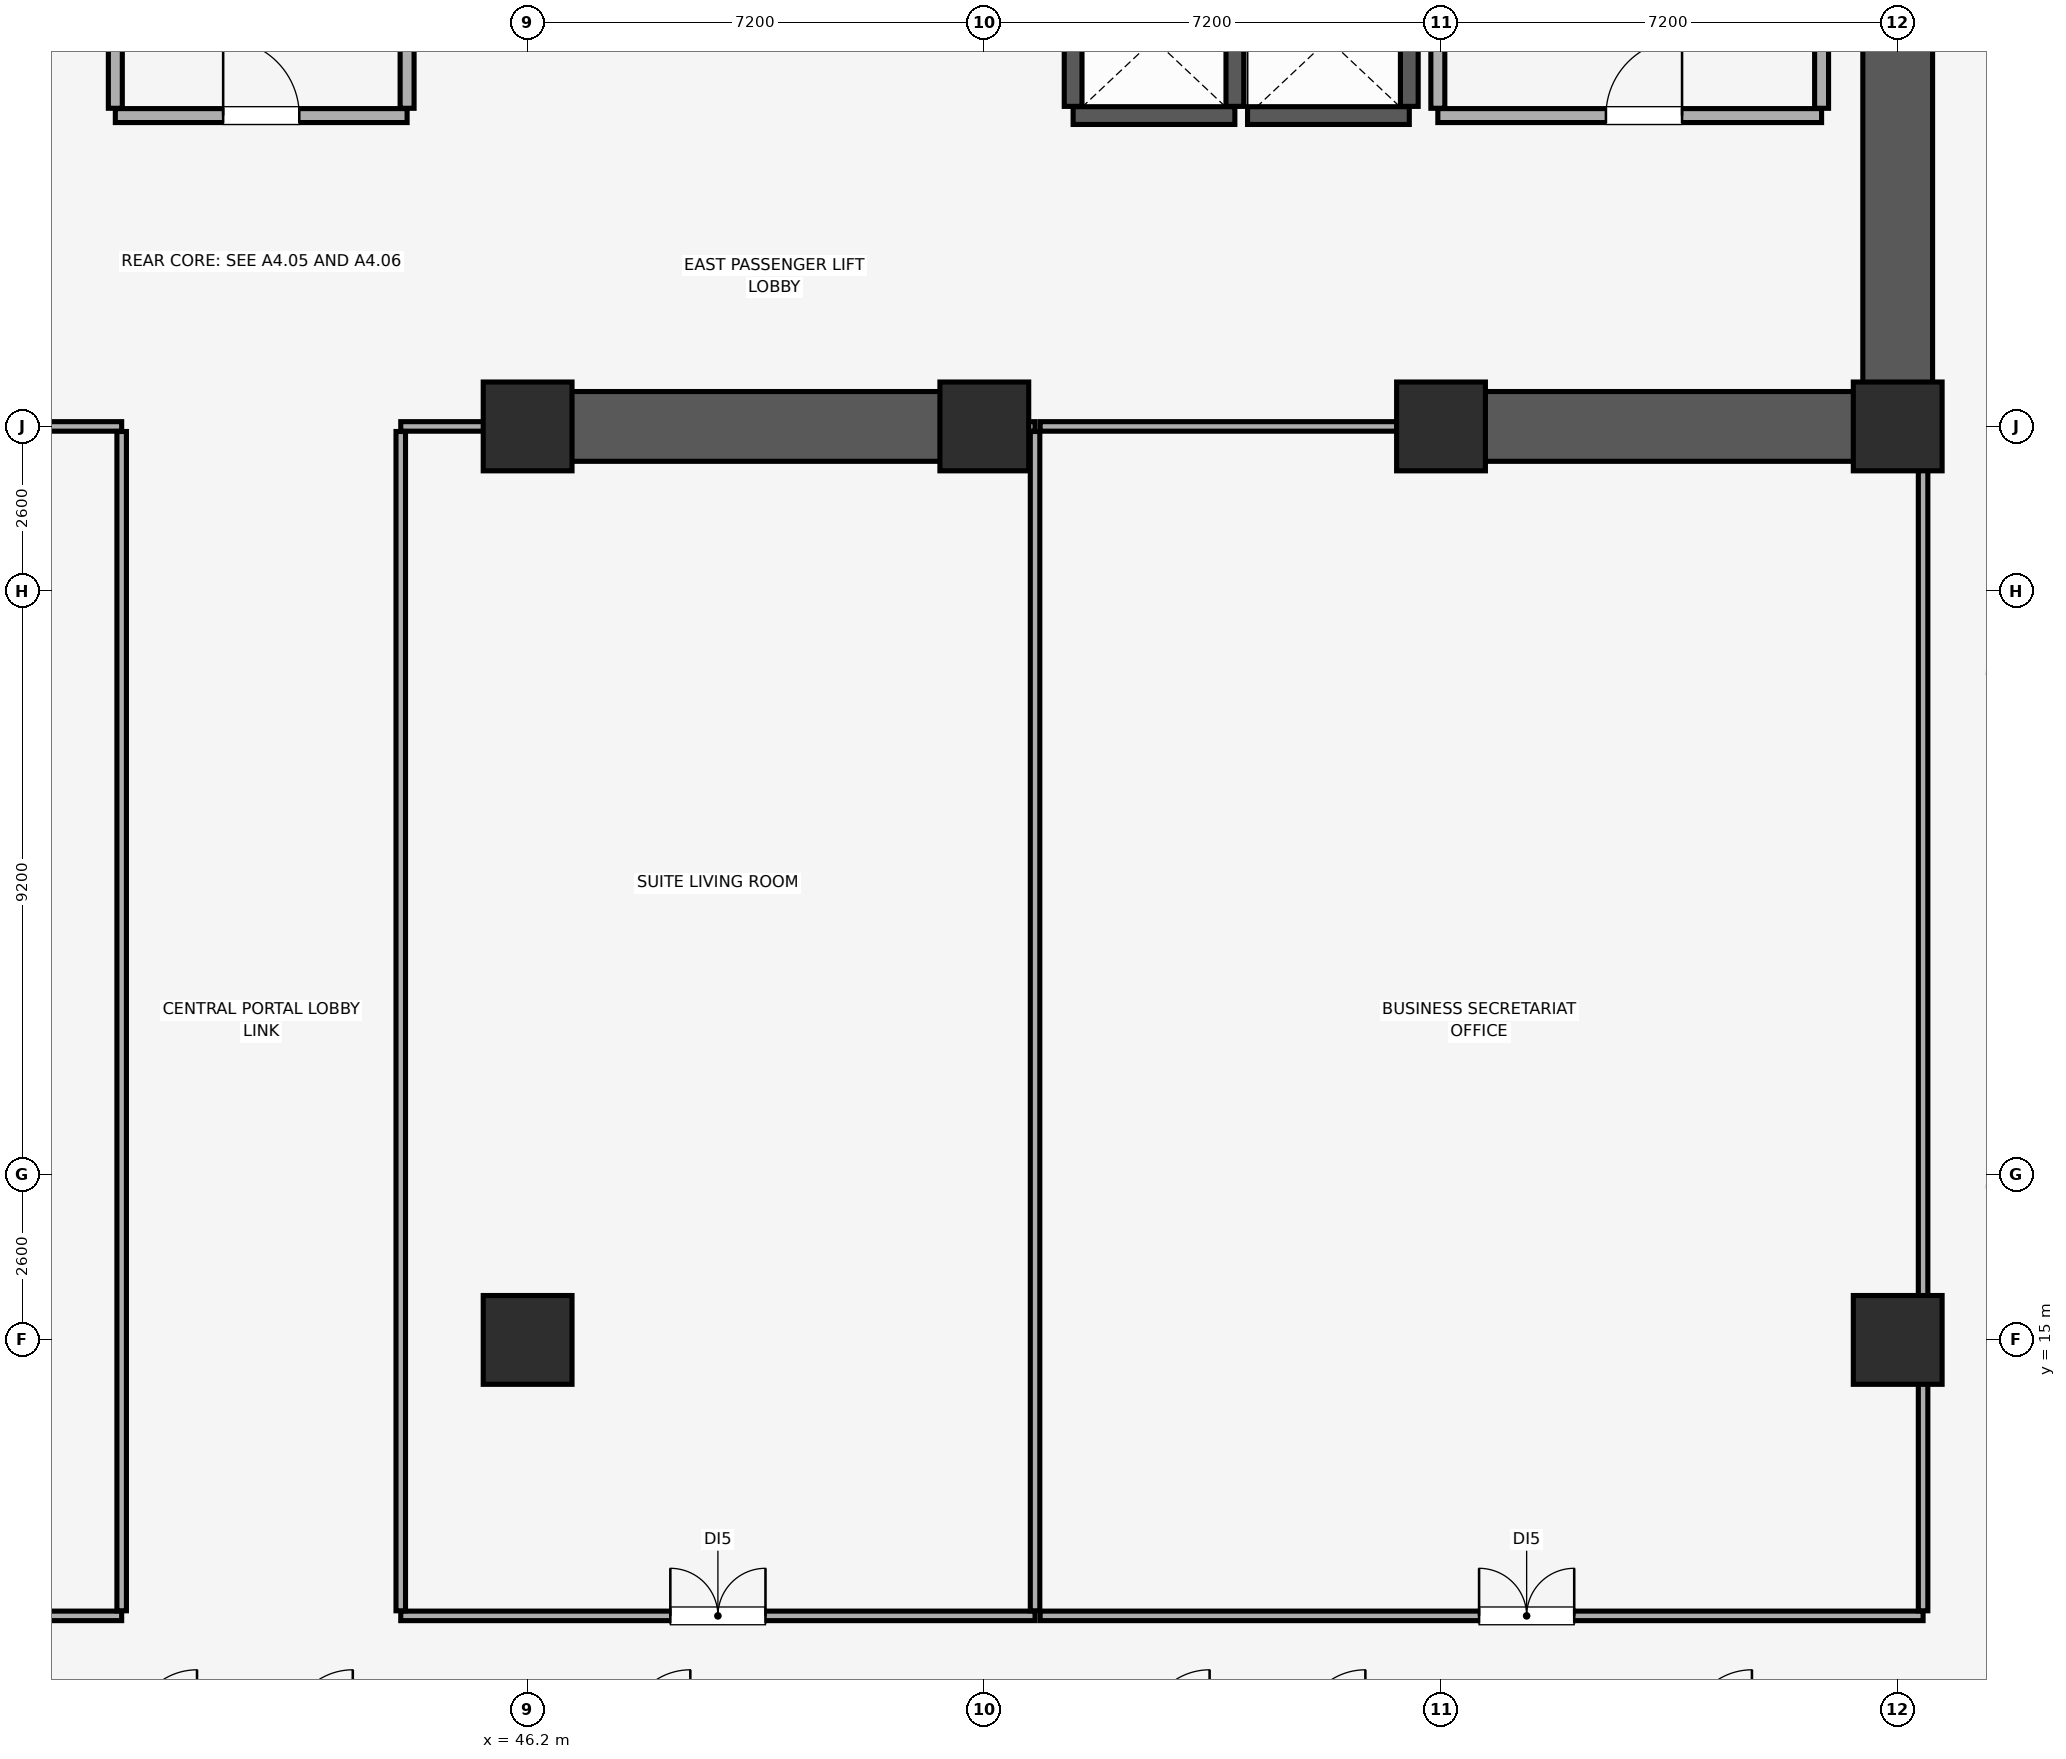
"""IFC4 building model, lengths in metres.
Left out: names, types, materials, properties, quantities, classifications, styles, units other than length and angle.
Written with IfcOpenShell. Run it as: python <this file> out.ifc"""

import sys

from ifc_helpers import new_model, si_unit, direction, frame, frame_2d, origin, origin_2d, place, context, subcontext, project, spatial, rectangle, extrude, element, fill, save


model = new_model("IFC4")
c1 = context("Model", 3, precision=1e-05, world=origin(), true_north=direction((0.0, 1.0)))
c2 = subcontext(c1, "Body", "Model", "MODEL_VIEW")
j1 = project(units=[si_unit("LENGTHUNIT", "METRE"), si_unit("PLANEANGLEUNIT", "RADIAN")], contexts=[c1])
p1 = place(None, origin())
s1 = spatial("IfcSite", under=j1, at=p1, CompositionType="ELEMENT")
p2 = place(p1, origin())
s2 = spatial("IfcBuilding", under=s1, at=p2, CompositionType="ELEMENT")
p3 = place(p2, frame((0.0, 0.0, 35.15)))
s3 = spatial("IfcBuildingStorey", under=s2, at=p3, CompositionType="ELEMENT", Elevation=35.15)
for number, where, z_axis, x_axis in (
    (1, (46.2, 15.0, 0.0), (0.0, 0.0, 1.0), (1.0, 0.0, 0.0)),
    (2, (67.8, 15.0, 0.0), (0.0, 0.0, 1.0), (1.0, 0.0, 0.0)),
    (3, (46.2, 29.4, 0.0), (0.0, 0.0, 1.0), (1.0, 0.0, 0.0)),
    (4, (53.4, 29.4, 0.0), (0.0, 0.0, 1.0), (1.0, 0.0, 0.0)),
    (5, (60.6, 29.4, 0.0), (0.0, 0.0, 1.0), (1.0, 0.0, 0.0)),
    (6, (67.8, 29.4, 0.0), (0.0, 0.0, 1.0), (1.0, 0.0, 0.0)),
):
    element("IfcColumn", number, at=place(p3, frame(where, z_axis=z_axis, x_axis=x_axis)), inside=s3, PredefinedType="COLUMN", context=c2, shape_type="SweptSolid", body=[
        extrude(rectangle(XDim=1.4, YDim=1.4, at=origin_2d()), origin(), (0.0, 0.0, 1.0), 3.51),
    ])
p4 = place(p3, frame((67.8, 29.4, 0.0), z_axis=(0.0, 0.0, 1.0), x_axis=(0.0, 1.0, 0.0)))
e7 = element("IfcWall", 7, at=p4, inside=s3, PredefinedType="SHEAR", context=c2, shape_type="SweptSolid", body=[
    extrude(rectangle(XDim=19.2, YDim=1.1, at=frame_2d((9.6, 0.0))), origin(), (0.0, 0.0, 1.0), 3.51),
])
p5 = place(p3, frame((46.0, 29.4, 0.0), z_axis=(0.0, 0.0, 1.0), x_axis=(1.0, 0.0, 0.0)))
e8 = element("IfcWall", 8, at=p5, inside=s3, PredefinedType="SHEAR", context=c2, shape_type="SweptSolid", body=[
    extrude(rectangle(XDim=7.6, YDim=1.1, at=frame_2d((3.8, 0.0))), origin(), (0.0, 0.0, 1.0), 3.51),
])
p6 = place(p3, frame((60.4, 29.4, 0.0), z_axis=(0.0, 0.0, 1.0), x_axis=(1.0, 0.0, 0.0)))
e9 = element("IfcWall", 9, at=p6, inside=s3, PredefinedType="SHEAR", context=c2, shape_type="SweptSolid", body=[
    extrude(rectangle(XDim=6.845, YDim=1.1, at=frame_2d((3.423, 0.0))), origin(), (0.0, 0.0, 1.0), 3.51),
])
p7 = place(p3, frame((54.8, 34.3, 0.0), z_axis=(0.0, 0.0, 1.0), x_axis=(1.0, 0.0, 0.0)))
e10 = element("IfcWall", 10, at=p7, inside=s3, PredefinedType="SHEAR", context=c2, shape_type="SweptSolid", body=[
    extrude(rectangle(XDim=2.55, YDim=0.28, at=frame_2d((1.275, 0.0))), origin(), (0.0, 0.0, 1.0), 3.51),
])
for number, where, z_axis, x_axis in (
    (11, (54.8, 34.445, 0.0), (0.0, 0.0, 1.0), (0.0, 1.0, 0.0)),
    (12, (57.35, 34.445, 0.0), (0.0, 0.0, 1.0), (0.0, 1.0, 0.0)),
):
    element("IfcWall", number, at=place(p3, frame(where, z_axis=z_axis, x_axis=x_axis)), inside=s3, PredefinedType="SHEAR", context=c2, shape_type="SweptSolid", body=[
        extrude(rectangle(XDim=2.11, YDim=0.28, at=frame_2d((1.055, 0.0))), origin(), (0.0, 0.0, 1.0), 3.51),
    ])
p8 = place(p3, frame((57.55, 34.3, 0.0), z_axis=(0.0, 0.0, 1.0), x_axis=(1.0, 0.0, 0.0)))
e13 = element("IfcWall", 13, at=p8, inside=s3, PredefinedType="SHEAR", context=c2, shape_type="SweptSolid", body=[
    extrude(rectangle(XDim=2.55, YDim=0.28, at=frame_2d((1.275, 0.0))), origin(), (0.0, 0.0, 1.0), 3.51),
])
p9 = place(p3, frame((60.1, 34.445, 0.0), z_axis=(0.0, 0.0, 1.0), x_axis=(0.0, 1.0, 0.0)))
e14 = element("IfcWall", 14, at=p9, inside=s3, PredefinedType="SHEAR", context=c2, shape_type="SweptSolid", body=[
    extrude(rectangle(XDim=2.11, YDim=0.28, at=frame_2d((1.055, 0.0))), origin(), (0.0, 0.0, 1.0), 3.51),
])
p10 = place(p3, frame((60.55, 34.3, 0.0), z_axis=(0.0, 0.0, 1.0), x_axis=(1.0, 0.0, 0.0)))
e15 = element("IfcWall", 15, at=p10, inside=s3, PredefinedType="PARTITIONING", context=c2, shape_type="SweptSolid", body=[
    extrude(rectangle(XDim=6.05, YDim=0.22, at=frame_2d((3.025, 0.0))), origin(), (0.0, 0.0, 1.0), 3.51),
])
p11 = place(p10, frame((2.65, 0.0, 0.0)))
e16 = element("IfcOpeningElement", 16, at=p11, cuts=e15, PredefinedType="OPENING", context=c2, shape_type="SweptSolid", body=[
    extrude(rectangle(XDim=1.2, YDim=2.15, at=frame_2d((0.6, 1.075))), frame((0.0, 0.12, 0.0), z_axis=(0.0, -1.0, 0.0), x_axis=(1.0, 0.0, 0.0)), (0.0, 0.0, 1.0), 0.24),
])
p12 = place(p3, frame((60.55, 34.415, 0.0), z_axis=(0.0, 0.0, 1.0), x_axis=(0.0, 1.0, 0.0)))
e17 = element("IfcWall", 17, at=p12, inside=s3, PredefinedType="PARTITIONING", context=c2, shape_type="SweptSolid", body=[
    extrude(rectangle(XDim=5.64, YDim=0.22, at=frame_2d((2.82, 0.0))), origin(), (0.0, 0.0, 1.0), 3.51),
])
p13 = place(p3, frame((66.6, 34.415, 0.0), z_axis=(0.0, 0.0, 1.0), x_axis=(0.0, 1.0, 0.0)))
e18 = element("IfcWall", 18, at=p13, inside=s3, PredefinedType="PARTITIONING", context=c2, shape_type="SweptSolid", body=[
    extrude(rectangle(XDim=5.43, YDim=0.22, at=frame_2d((2.715, 0.0))), origin(), (0.0, 0.0, 1.0), 3.51),
])
p14 = place(p3, frame((39.7, 34.3, 0.0), z_axis=(0.0, 0.0, 1.0), x_axis=(1.0, 0.0, 0.0)))
e19 = element("IfcWall", 19, at=p14, inside=s3, PredefinedType="PARTITIONING", context=c2, shape_type="SweptSolid", body=[
    extrude(rectangle(XDim=4.6, YDim=0.22, at=frame_2d((2.3, 0.0))), origin(), (0.0, 0.0, 1.0), 3.51),
])
p15 = place(p14, frame((1.7, 0.0, 0.0)))
e20 = element("IfcOpeningElement", 20, at=p15, cuts=e19, PredefinedType="OPENING", context=c2, shape_type="SweptSolid", body=[
    extrude(rectangle(XDim=1.2, YDim=2.15, at=frame_2d((0.6, 1.075))), frame((0.0, 0.12, 0.0), z_axis=(0.0, -1.0, 0.0), x_axis=(1.0, 0.0, 0.0)), (0.0, 0.0, 1.0), 0.24),
])
for number, where, z_axis, x_axis in (
    (21, (39.7, 34.415, 0.0), (0.0, 0.0, 1.0), (0.0, 1.0, 0.0)),
    (22, (44.3, 34.415, 0.0), (0.0, 0.0, 1.0), (0.0, 1.0, 0.0)),
):
    element("IfcWall", number, at=place(p3, frame(where, z_axis=z_axis, x_axis=x_axis)), inside=s3, PredefinedType="PARTITIONING", context=c2, shape_type="SweptSolid", body=[
        extrude(rectangle(XDim=5.785, YDim=0.22, at=frame_2d((2.893, 0.0))), origin(), (0.0, 0.0, 1.0), 3.51),
    ])
p16 = place(p3, frame((25.28, 10.65, 0.0), z_axis=(0.0, 0.0, 1.0), x_axis=(1.0, 0.0, 0.0)))
e23 = element("IfcWall", 23, at=p16, inside=s3, PredefinedType="PARTITIONING", context=c2, shape_type="SweptSolid", body=[
    extrude(rectangle(XDim=14.52, YDim=0.15, at=frame_2d((7.26, 0.0))), origin(), (0.0, 0.0, 1.0), 3.51),
])
p17 = place(p16, frame((6.47, 0.0, 0.0)))
e24 = element("IfcOpeningElement", 24, at=p17, cuts=e23, PredefinedType="OPENING", context=c2, shape_type="SweptSolid", body=[
    extrude(rectangle(XDim=1.5, YDim=2.25, at=frame_2d((0.75, 1.125))), frame((0.0, 0.085, 0.0), z_axis=(0.0, -1.0, 0.0), x_axis=(1.0, 0.0, 0.0)), (0.0, 0.0, 1.0), 0.17),
])
p18 = place(p3, frame((38.01, 29.4, 0.0), z_axis=(0.0, 0.0, 1.0), x_axis=(1.0, 0.0, 0.0)))
e25 = element("IfcWall", 25, at=p18, inside=s3, PredefinedType="PARTITIONING", context=c2, shape_type="SweptSolid", body=[
    extrude(rectangle(XDim=1.79, YDim=0.15, at=frame_2d((0.895, 0.0))), origin(), (0.0, 0.0, 1.0), 2.41),
])
p19 = place(p3, frame((39.8, 10.73, 0.0), z_axis=(0.0, 0.0, 1.0), x_axis=(0.0, 1.0, 0.0)))
e26 = element("IfcWall", 26, at=p19, inside=s3, PredefinedType="PARTITIONING", context=c2, shape_type="SweptSolid", body=[
    extrude(rectangle(XDim=18.59, YDim=0.15, at=frame_2d((9.295, 0.0))), origin(), (0.0, 0.0, 1.0), 3.51),
])
p20 = place(p3, frame((44.2, 10.65, 0.0), z_axis=(0.0, 0.0, 1.0), x_axis=(1.0, 0.0, 0.0)))
e27 = element("IfcWall", 27, at=p20, inside=s3, PredefinedType="PARTITIONING", context=c2, shape_type="SweptSolid", body=[
    extrude(rectangle(XDim=10.0, YDim=0.15, at=frame_2d((5.0, 0.0))), origin(), (0.0, 0.0, 1.0), 3.51),
])
p21 = place(p20, frame((4.25, 0.0, 0.0)))
e28 = element("IfcOpeningElement", 28, at=p21, cuts=e27, PredefinedType="OPENING", context=c2, shape_type="SweptSolid", body=[
    extrude(rectangle(XDim=1.5, YDim=2.25, at=frame_2d((0.75, 1.125))), frame((0.0, 0.085, 0.0), z_axis=(0.0, -1.0, 0.0), x_axis=(1.0, 0.0, 0.0)), (0.0, 0.0, 1.0), 0.17),
])
p22 = place(p3, frame((44.2, 29.4, 0.0), z_axis=(0.0, 0.0, 1.0), x_axis=(1.0, 0.0, 0.0)))
e29 = element("IfcWall", 29, at=p22, inside=s3, PredefinedType="PARTITIONING", context=c2, shape_type="SweptSolid", body=[
    extrude(rectangle(XDim=1.79, YDim=0.15, at=frame_2d((0.895, 0.0))), origin(), (0.0, 0.0, 1.0), 2.41),
])
p23 = place(p3, frame((53.61, 29.4, 0.0), z_axis=(0.0, 0.0, 1.0), x_axis=(1.0, 0.0, 0.0)))
e30 = element("IfcWall", 30, at=p23, inside=s3, PredefinedType="PARTITIONING", context=c2, shape_type="SweptSolid", body=[
    extrude(rectangle(XDim=0.59, YDim=0.15, at=frame_2d((0.295, 0.0))), origin(), (0.0, 0.0, 1.0), 2.41),
])
for number, where, z_axis, x_axis in (
    (31, (44.2, 10.73, 0.0), (0.0, 0.0, 1.0), (0.0, 1.0, 0.0)),
    (32, (54.2, 10.73, 0.0), (0.0, 0.0, 1.0), (0.0, 1.0, 0.0)),
):
    element("IfcWall", number, at=place(p3, frame(where, z_axis=z_axis, x_axis=x_axis)), inside=s3, PredefinedType="PARTITIONING", context=c2, shape_type="SweptSolid", body=[
        extrude(rectangle(XDim=18.59, YDim=0.15, at=frame_2d((9.295, 0.0))), origin(), (0.0, 0.0, 1.0), 3.51),
    ])
p24 = place(p3, frame((54.28, 10.65, 0.0), z_axis=(0.0, 0.0, 1.0), x_axis=(1.0, 0.0, 0.0)))
e33 = element("IfcWall", 33, at=p24, inside=s3, PredefinedType="PARTITIONING", context=c2, shape_type="SweptSolid", body=[
    extrude(rectangle(XDim=13.92, YDim=0.15, at=frame_2d((6.96, 0.0))), origin(), (0.0, 0.0, 1.0), 3.51),
])
p25 = place(p24, frame((6.92, 0.0, 0.0)))
e34 = element("IfcOpeningElement", 34, at=p25, cuts=e33, PredefinedType="OPENING", context=c2, shape_type="SweptSolid", body=[
    extrude(rectangle(XDim=1.5, YDim=2.25, at=frame_2d((0.75, 1.125))), frame((0.0, 0.085, 0.0), z_axis=(0.0, -1.0, 0.0), x_axis=(1.0, 0.0, 0.0)), (0.0, 0.0, 1.0), 0.17),
])
p26 = place(p3, frame((54.28, 29.4, 0.0), z_axis=(0.0, 0.0, 1.0), x_axis=(1.0, 0.0, 0.0)))
e35 = element("IfcWall", 35, at=p26, inside=s3, PredefinedType="PARTITIONING", context=c2, shape_type="SweptSolid", body=[
    extrude(rectangle(XDim=6.11, YDim=0.15, at=frame_2d((3.055, 0.0))), origin(), (0.0, 0.0, 1.0), 2.41),
])
p27 = place(p3, frame((68.2, 10.73, 0.0), z_axis=(0.0, 0.0, 1.0), x_axis=(0.0, 1.0, 0.0)))
e36 = element("IfcWall", 36, at=p27, inside=s3, PredefinedType="PARTITIONING", context=c2, shape_type="SweptSolid", body=[
    extrude(rectangle(XDim=18.66, YDim=0.15, at=frame_2d((9.33, 0.0))), origin(), (0.0, 0.0, 1.0), 3.51),
])
p28 = place(p11, origin())
e37 = element("IfcDoor", 37, at=p28, inside=s3, OperationType="SINGLE_SWING_RIGHT", PredefinedType="DOOR", context=c2, shape_type="SweptSolid", body=[
    extrude(rectangle(XDim=1.2, YDim=2.15, at=frame_2d((0.6, 1.075))), frame((0.0, 0.025, 0.0), z_axis=(0.0, -1.0, 0.0), x_axis=(1.0, 0.0, 0.0)), (0.0, 0.0, 1.0), 0.05),
])
fill(e16, e37)
p29 = place(p15, origin())
e38 = element("IfcDoor", 38, at=p29, inside=s3, OperationType="SINGLE_SWING_LEFT", PredefinedType="DOOR", context=c2, shape_type="SweptSolid", body=[
    extrude(rectangle(XDim=1.2, YDim=2.15, at=frame_2d((0.6, 1.075))), frame((0.0, 0.025, 0.0), z_axis=(0.0, -1.0, 0.0), x_axis=(1.0, 0.0, 0.0)), (0.0, 0.0, 1.0), 0.05),
])
fill(e20, e38)
p30 = place(p21, origin())
e39 = element("IfcDoor", 39, at=p30, inside=s3, OperationType="DOUBLE_DOOR_SINGLE_SWING", PredefinedType="DOOR", context=c2, shape_type="SweptSolid", body=[
    extrude(rectangle(XDim=1.5, YDim=2.25, at=frame_2d((0.75, 1.125))), frame((0.0, 0.025, 0.0), z_axis=(0.0, -1.0, 0.0), x_axis=(1.0, 0.0, 0.0)), (0.0, 0.0, 1.0), 0.05),
])
fill(e28, e39)
p31 = place(p25, origin())
e40 = element("IfcDoor", 40, at=p31, inside=s3, OperationType="DOUBLE_DOOR_SINGLE_SWING", PredefinedType="DOOR", context=c2, shape_type="SweptSolid", body=[
    extrude(rectangle(XDim=1.5, YDim=2.25, at=frame_2d((0.75, 1.125))), frame((0.0, 0.025, 0.0), z_axis=(0.0, -1.0, 0.0), x_axis=(1.0, 0.0, 0.0)), (0.0, 0.0, 1.0), 0.05),
])
fill(e34, e40)
save(model, sys.argv[1])
